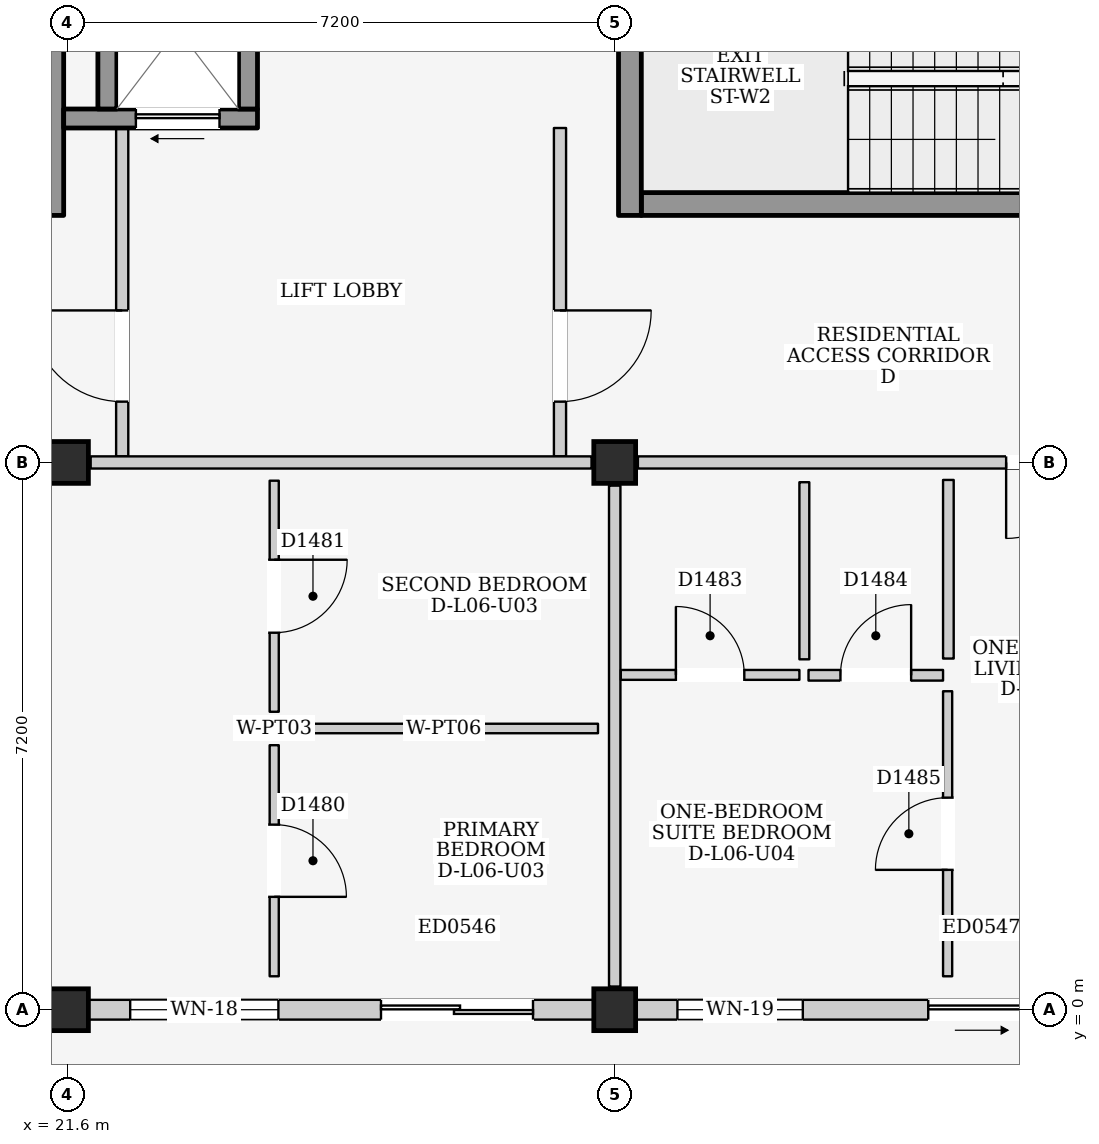
"""IFC4 building model, lengths in metres.
Left out: names, types, materials, properties, quantities, classifications, styles, units other than length and angle.
Written with IfcOpenShell. Run it as: python <this file> out.ifc"""

import sys

from ifc_helpers import new_model, si_unit, direction, frame, frame_2d, origin, origin_2d, place, context, subcontext, project, spatial, rectangle, extrude, element, fill, save


model = new_model("IFC4")
c1 = context("Model", 3, precision=1e-05, world=origin(), true_north=direction((0.0, 1.0)))
c2 = subcontext(c1, "Body", "Model", "MODEL_VIEW")
j1 = project(units=[si_unit("LENGTHUNIT", "METRE"), si_unit("PLANEANGLEUNIT", "RADIAN")], contexts=[c1])
p1 = place(None, origin())
s1 = spatial("IfcSite", under=j1, at=p1, CompositionType="ELEMENT")
p2 = place(p1, origin())
s2 = spatial("IfcBuilding", under=s1, at=p2, CompositionType="ELEMENT")
p3 = place(p2, frame((0.0, 0.0, 21.9)))
s3 = spatial("IfcBuildingStorey", under=s2, at=p3, CompositionType="ELEMENT", Elevation=21.9)
for number, where, z_axis, x_axis in (
    (1, (21.6, 0.0, 0.0), (0.0, 0.0, 1.0), (1.0, 0.0, 0.0)),
    (2, (21.6, 7.2, 0.0), (0.0, 0.0, 1.0), (1.0, 0.0, 0.0)),
    (3, (28.8, 0.0, 0.0), (0.0, 0.0, 1.0), (1.0, 0.0, 0.0)),
    (4, (28.8, 7.2, 0.0), (0.0, 0.0, 1.0), (1.0, 0.0, 0.0)),
):
    element("IfcColumn", number, at=place(p3, frame(where, z_axis=z_axis, x_axis=x_axis)), inside=s3, PredefinedType="COLUMN", context=c2, shape_type="SweptSolid", body=[
        extrude(rectangle(XDim=0.55, YDim=0.55, at=origin_2d()), origin(), (0.0, 0.0, 1.0), 3.2),
    ])
p4 = place(p3, frame((21.875, 0.0, 0.0), z_axis=(0.0, 0.0, 1.0), x_axis=(1.0, 0.0, 0.0)))
e5 = element("IfcWall", 5, at=p4, inside=s3, PredefinedType="ELEMENTEDWALL", context=c2, shape_type="SweptSolid", body=[
    extrude(rectangle(XDim=6.65, YDim=0.26, at=frame_2d((3.325, 0.0))), origin(), (0.0, 0.0, 1.0), 2.515),
])
p5 = place(p4, frame((3.85, 0.0, 0.0)))
e6 = element("IfcOpeningElement", 6, at=p5, cuts=e5, PredefinedType="OPENING", context=c2, shape_type="SweptSolid", body=[
    extrude(rectangle(XDim=2.0, YDim=2.12, at=frame_2d((1.0, 1.06))), frame((0.0, 0.145, 0.0), z_axis=(0.0, -1.0, 0.0), x_axis=(1.0, 0.0, 0.0)), (0.0, 0.0, 1.0), 0.29),
])
p6 = place(p4, frame((0.55, 0.0, 0.855)))
e7 = element("IfcOpeningElement", 7, at=p6, cuts=e5, PredefinedType="OPENING", context=c2, shape_type="SweptSolid", body=[
    extrude(rectangle(XDim=1.95, YDim=1.55, at=frame_2d((0.975, 0.775))), frame((0.0, 0.145, 0.0), z_axis=(0.0, -1.0, 0.0), x_axis=(1.0, 0.0, 0.0)), (0.0, 0.0, 1.0), 0.29),
])
p7 = place(p3, frame((29.075, 0.0, 0.0), z_axis=(0.0, 0.0, 1.0), x_axis=(1.0, 0.0, 0.0)))
e8 = element("IfcWall", 8, at=p7, inside=s3, PredefinedType="ELEMENTEDWALL", context=c2, shape_type="SweptSolid", body=[
    extrude(rectangle(XDim=6.65, YDim=0.26, at=frame_2d((3.325, 0.0))), origin(), (0.0, 0.0, 1.0), 2.515),
])
p8 = place(p7, frame((3.85, 0.0, 0.0)))
e9 = element("IfcOpeningElement", 9, at=p8, cuts=e8, PredefinedType="OPENING", context=c2, shape_type="SweptSolid", body=[
    extrude(rectangle(XDim=1.4, YDim=2.1, at=frame_2d((0.7, 1.05))), frame((0.0, 0.145, 0.0), z_axis=(0.0, -1.0, 0.0), x_axis=(1.0, 0.0, 0.0)), (0.0, 0.0, 1.0), 0.29),
])
p9 = place(p7, frame((0.55, 0.0, 0.9)))
e10 = element("IfcOpeningElement", 10, at=p9, cuts=e8, PredefinedType="OPENING", context=c2, shape_type="SweptSolid", body=[
    extrude(rectangle(XDim=1.65, YDim=1.35, at=frame_2d((0.825, 0.675))), frame((0.0, 0.145, 0.0), z_axis=(0.0, -1.0, 0.0), x_axis=(1.0, 0.0, 0.0)), (0.0, 0.0, 1.0), 0.29),
])
p10 = place(p3, frame((21.4, 10.45, 0.0), z_axis=(0.0, 0.0, 1.0), x_axis=(0.0, 1.0, 0.0)))
e11 = element("IfcWall", 11, at=p10, inside=s3, PredefinedType="SHEAR", context=c2, shape_type="SweptSolid", body=[
    extrude(rectangle(XDim=3.75, YDim=0.3, at=frame_2d((1.875, 0.0))), origin(), (0.0, 0.0, 1.0), 2.98),
])
p11 = place(p3, frame((22.32, 7.28, 0.0), z_axis=(0.0, 0.0, 1.0), x_axis=(0.0, 1.0, 0.0)))
e12 = element("IfcWall", 12, at=p11, inside=s3, PredefinedType="PARTITIONING", context=c2, shape_type="SweptSolid", body=[
    extrude(rectangle(XDim=4.32, YDim=0.16, at=frame_2d((2.16, 0.0))), origin(), (0.0, 0.0, 1.0), 2.98),
])
p12 = place(p11, frame((0.72, 0.0, 0.0)))
e13 = element("IfcOpeningElement", 13, at=p12, cuts=e12, PredefinedType="OPENING", context=c2, shape_type="SweptSolid", body=[
    extrude(rectangle(XDim=1.2, YDim=2.2, at=frame_2d((0.6, 1.1))), frame((0.0, 0.095, 0.0), z_axis=(0.0, -1.0, 0.0), x_axis=(1.0, 0.0, 0.0)), (0.0, 0.0, 1.0), 0.19),
])
p13 = place(p3, frame((28.08, 7.28, 0.0), z_axis=(0.0, 0.0, 1.0), x_axis=(0.0, 1.0, 0.0)))
e14 = element("IfcWall", 14, at=p13, inside=s3, PredefinedType="PARTITIONING", context=c2, shape_type="SweptSolid", body=[
    extrude(rectangle(XDim=4.32, YDim=0.16, at=frame_2d((2.16, 0.0))), origin(), (0.0, 0.0, 1.0), 2.98),
])
p14 = place(p13, frame((0.72, 0.0, 0.0)))
e15 = element("IfcOpeningElement", 15, at=p14, cuts=e14, PredefinedType="OPENING", context=c2, shape_type="SweptSolid", body=[
    extrude(rectangle(XDim=1.2, YDim=2.2, at=frame_2d((0.6, 1.1))), frame((0.0, 0.095, 0.0), z_axis=(0.0, -1.0, 0.0), x_axis=(1.0, 0.0, 0.0)), (0.0, 0.0, 1.0), 0.19),
])
p15 = place(p3, frame((21.55, 11.725, 0.0), z_axis=(0.0, 0.0, 1.0), x_axis=(1.0, 0.0, 0.0)))
e16 = element("IfcWall", 16, at=p15, inside=s3, PredefinedType="SHEAR", context=c2, shape_type="SweptSolid", body=[
    extrude(rectangle(XDim=2.55, YDim=0.25, at=frame_2d((1.275, 0.0))), origin(), (0.0, 0.0, 1.0), 2.98),
])
p16 = place(p15, frame((0.95, 0.0, 0.0)))
e17 = element("IfcOpeningElement", 17, at=p16, cuts=e16, PredefinedType="OPENING", context=c2, shape_type="SweptSolid", body=[
    extrude(rectangle(XDim=1.1, YDim=2.15, at=frame_2d((0.55, 1.075))), frame((0.0, 0.14, 0.0), z_axis=(0.0, -1.0, 0.0), x_axis=(1.0, 0.0, 0.0)), (0.0, 0.0, 1.0), 0.28),
])
for number, where, z_axis, x_axis in (
    (18, (22.125, 11.85, 0.0), (0.0, 0.0, 1.0), (0.0, 1.0, 0.0)),
    (19, (23.975, 11.85, 0.0), (0.0, 0.0, 1.0), (0.0, 1.0, 0.0)),
):
    element("IfcWall", number, at=place(p3, frame(where, z_axis=z_axis, x_axis=x_axis)), inside=s3, PredefinedType="SHEAR", context=c2, shape_type="SweptSolid", body=[
        extrude(rectangle(XDim=2.1, YDim=0.25, at=frame_2d((1.05, 0.0))), origin(), (0.0, 0.0, 1.0), 2.98),
    ])
p17 = place(p3, frame((29.15, 10.6, 0.0), z_axis=(0.0, 0.0, 1.0), x_axis=(1.0, 0.0, 0.0)))
e20 = element("IfcWall", 20, at=p17, inside=s3, PredefinedType="SHEAR", context=c2, shape_type="SweptSolid", body=[
    extrude(rectangle(XDim=6.5, YDim=0.3, at=frame_2d((3.25, 0.0))), origin(), (0.0, 0.0, 1.0), 2.98),
])
p18 = place(p17, frame((5.17, 0.0, 0.0)))
e21 = element("IfcOpeningElement", 21, at=p18, cuts=e20, PredefinedType="OPENING", context=c2, shape_type="SweptSolid", body=[
    extrude(rectangle(XDim=1.15, YDim=2.2, at=frame_2d((0.575, 1.1))), frame((0.0, 0.165, 0.0), z_axis=(0.0, -1.0, 0.0), x_axis=(1.0, 0.0, 0.0)), (0.0, 0.0, 1.0), 0.33),
])
p19 = place(p3, frame((29.0, 10.45, 0.0), z_axis=(0.0, 0.0, 1.0), x_axis=(0.0, 1.0, 0.0)))
e22 = element("IfcWall", 22, at=p19, inside=s3, PredefinedType="SHEAR", context=c2, shape_type="SweptSolid", body=[
    extrude(rectangle(XDim=3.6, YDim=0.3, at=frame_2d((1.8, 0.0))), origin(), (0.0, 0.0, 1.0), 2.98),
])
p20 = place(p3, frame((21.905, 7.2, 0.0), z_axis=(0.0, 0.0, 1.0), x_axis=(1.0, 0.0, 0.0)))
e23 = element("IfcWall", 23, at=p20, inside=s3, PredefinedType="PARTITIONING", context=c2, shape_type="SweptSolid", body=[
    extrude(rectangle(XDim=6.59, YDim=0.16, at=frame_2d((3.295, 0.0))), origin(), (0.0, 0.0, 1.0), 2.365),
])
p21 = place(p3, frame((28.8, 0.305, 0.0), z_axis=(0.0, 0.0, 1.0), x_axis=(0.0, 1.0, 0.0)))
e24 = element("IfcWall", 24, at=p21, inside=s3, PredefinedType="PARTITIONING", context=c2, shape_type="SweptSolid", body=[
    extrude(rectangle(XDim=6.59, YDim=0.15, at=frame_2d((3.295, 0.0))), origin(), (0.0, 0.0, 1.0), 2.465),
])
p22 = place(p3, frame((24.32, 0.44, 0.0), z_axis=(0.0, 0.0, 1.0), x_axis=(0.0, 1.0, 0.0)))
e25 = element("IfcWall", 25, at=p22, inside=s3, PredefinedType="PARTITIONING", context=c2, shape_type="SweptSolid", body=[
    extrude(rectangle(XDim=3.04, YDim=0.12, at=frame_2d((1.52, 0.0))), origin(), (0.0, 0.0, 1.0), 2.98),
])
p23 = place(p22, frame((1.045, 0.0, 0.0)))
e26 = element("IfcOpeningElement", 26, at=p23, cuts=e25, PredefinedType="OPENING", context=c2, shape_type="SweptSolid", body=[
    extrude(rectangle(XDim=0.95, YDim=2.15, at=frame_2d((0.475, 1.075))), frame((0.0, 0.075, 0.0), z_axis=(0.0, -1.0, 0.0), x_axis=(1.0, 0.0, 0.0)), (0.0, 0.0, 1.0), 0.15),
])
p24 = place(p3, frame((24.52, 3.7, 0.0), z_axis=(0.0, 0.0, 1.0), x_axis=(1.0, 0.0, 0.0)))
e27 = element("IfcWall", 27, at=p24, inside=s3, PredefinedType="PARTITIONING", context=c2, shape_type="SweptSolid", body=[
    extrude(rectangle(XDim=4.06, YDim=0.125, at=frame_2d((2.03, 0.0))), origin(), (0.0, 0.0, 1.0), 2.98),
])
p25 = place(p3, frame((24.32, 3.92, 0.0), z_axis=(0.0, 0.0, 1.0), x_axis=(0.0, 1.0, 0.0)))
e28 = element("IfcWall", 28, at=p25, inside=s3, PredefinedType="PARTITIONING", context=c2, shape_type="SweptSolid", body=[
    extrude(rectangle(XDim=3.04, YDim=0.12, at=frame_2d((1.52, 0.0))), origin(), (0.0, 0.0, 1.0), 2.98),
])
p26 = place(p25, frame((1.04, 0.0, 0.0)))
e29 = element("IfcOpeningElement", 29, at=p26, cuts=e28, PredefinedType="OPENING", context=c2, shape_type="SweptSolid", body=[
    extrude(rectangle(XDim=0.96, YDim=2.15, at=frame_2d((0.48, 1.075))), frame((0.0, 0.075, 0.0), z_axis=(0.0, -1.0, 0.0), x_axis=(1.0, 0.0, 0.0)), (0.0, 0.0, 1.0), 0.15),
])
p27 = place(p3, frame((29.105, 7.2, 0.0), z_axis=(0.0, 0.0, 1.0), x_axis=(1.0, 0.0, 0.0)))
e30 = element("IfcWall", 30, at=p27, inside=s3, PredefinedType="PARTITIONING", context=c2, shape_type="SweptSolid", body=[
    extrude(rectangle(XDim=6.59, YDim=0.16, at=frame_2d((3.295, 0.0))), origin(), (0.0, 0.0, 1.0), 2.365),
])
p28 = place(p27, frame((4.845, 0.0, 0.0)))
e31 = element("IfcOpeningElement", 31, at=p28, cuts=e30, PredefinedType="OPENING", context=c2, shape_type="SweptSolid", body=[
    extrude(rectangle(XDim=1.0, YDim=2.15, at=frame_2d((0.5, 1.075))), frame((0.0, 0.095, 0.0), z_axis=(0.0, -1.0, 0.0), x_axis=(1.0, 0.0, 0.0)), (0.0, 0.0, 1.0), 0.19),
])
p29 = place(p3, frame((28.88, 4.405, 0.0), z_axis=(0.0, 0.0, 1.0), x_axis=(1.0, 0.0, 0.0)))
e32 = element("IfcWall", 32, at=p29, inside=s3, PredefinedType="PARTITIONING", context=c2, shape_type="SweptSolid", body=[
    extrude(rectangle(XDim=2.35, YDim=0.13, at=frame_2d((1.175, 0.0))), origin(), (0.0, 0.0, 1.0), 2.98),
])
p30 = place(p29, frame((0.725, 0.0, 0.0)))
e33 = element("IfcOpeningElement", 33, at=p30, cuts=e32, PredefinedType="OPENING", context=c2, shape_type="SweptSolid", body=[
    extrude(rectangle(XDim=0.9, YDim=2.1, at=frame_2d((0.45, 1.05))), frame((0.0, 0.08, 0.0), z_axis=(0.0, -1.0, 0.0), x_axis=(1.0, 0.0, 0.0)), (0.0, 0.0, 1.0), 0.16),
])
p31 = place(p3, frame((31.295, 4.61, 0.0), z_axis=(0.0, 0.0, 1.0), x_axis=(0.0, 1.0, 0.0)))
e34 = element("IfcWall", 34, at=p31, inside=s3, PredefinedType="PARTITIONING", context=c2, shape_type="SweptSolid", body=[
    extrude(rectangle(XDim=2.33, YDim=0.13, at=frame_2d((1.165, 0.0))), origin(), (0.0, 0.0, 1.0), 2.98),
])
p32 = place(p3, frame((31.35, 4.4, 0.0), z_axis=(0.0, 0.0, 1.0), x_axis=(1.0, 0.0, 0.0)))
e35 = element("IfcWall", 35, at=p32, inside=s3, PredefinedType="PARTITIONING", context=c2, shape_type="SweptSolid", body=[
    extrude(rectangle(XDim=1.77, YDim=0.14, at=frame_2d((0.885, 0.0))), origin(), (0.0, 0.0, 1.0), 2.98),
])
p33 = place(p32, frame((0.42, 0.0, 0.0)))
e36 = element("IfcOpeningElement", 36, at=p33, cuts=e35, PredefinedType="OPENING", context=c2, shape_type="SweptSolid", body=[
    extrude(rectangle(XDim=0.93, YDim=2.14, at=frame_2d((0.465, 1.07))), frame((0.0, 0.085, 0.0), z_axis=(0.0, -1.0, 0.0), x_axis=(1.0, 0.0, 0.0)), (0.0, 0.0, 1.0), 0.17),
])
p34 = place(p3, frame((33.19, 4.62, 0.0), z_axis=(0.0, 0.0, 1.0), x_axis=(0.0, 1.0, 0.0)))
e37 = element("IfcWall", 37, at=p34, inside=s3, PredefinedType="PARTITIONING", context=c2, shape_type="SweptSolid", body=[
    extrude(rectangle(XDim=2.35, YDim=0.14, at=frame_2d((1.175, 0.0))), origin(), (0.0, 0.0, 1.0), 2.98),
])
p35 = place(p3, frame((33.18, 0.44, 0.0), z_axis=(0.0, 0.0, 1.0), x_axis=(0.0, 1.0, 0.0)))
e38 = element("IfcWall", 38, at=p35, inside=s3, PredefinedType="PARTITIONING", context=c2, shape_type="SweptSolid", body=[
    extrude(rectangle(XDim=3.75, YDim=0.12, at=frame_2d((1.875, 0.0))), origin(), (0.0, 0.0, 1.0), 2.98),
])
p36 = place(p35, frame((1.4, 0.0, 0.0)))
e39 = element("IfcOpeningElement", 39, at=p36, cuts=e38, PredefinedType="OPENING", context=c2, shape_type="SweptSolid", body=[
    extrude(rectangle(XDim=0.95, YDim=2.15, at=frame_2d((0.475, 1.075))), frame((0.0, 0.075, 0.0), z_axis=(0.0, -1.0, 0.0), x_axis=(1.0, 0.0, 0.0)), (0.0, 0.0, 1.0), 0.15),
])
p37 = place(p5, frame((2.0, 0.0, 0.0), z_axis=(0.0, 0.0, 1.0), x_axis=(-1.0, 0.0, 0.0)))
e40 = element("IfcDoor", 40, at=p37, inside=s3, OperationType="DOUBLE_DOOR_SLIDING", PredefinedType="DOOR", context=c2, shape_type="SweptSolid", body=[
    extrude(rectangle(XDim=2.0, YDim=2.12, at=frame_2d((1.0, 1.06))), frame((0.0, 0.025, 0.0), z_axis=(0.0, -1.0, 0.0), x_axis=(1.0, 0.0, 0.0)), (0.0, 0.0, 1.0), 0.05),
])
fill(e6, e40)
p38 = place(p6, origin())
e41 = element("IfcWindow", 41, at=p38, inside=s3, PartitioningType="DOUBLE_PANEL_VERTICAL", PredefinedType="WINDOW", context=c2, shape_type="SweptSolid", body=[
    extrude(rectangle(XDim=1.95, YDim=1.55, at=frame_2d((0.975, 0.775))), frame((0.0, 0.03, 0.0), z_axis=(0.0, -1.0, 0.0), x_axis=(1.0, 0.0, 0.0)), (0.0, 0.0, 1.0), 0.06),
])
fill(e7, e41)
p39 = place(p8, frame((1.4, 0.0, 0.0), z_axis=(0.0, 0.0, 1.0), x_axis=(-1.0, 0.0, 0.0)))
e42 = element("IfcDoor", 42, at=p39, inside=s3, OperationType="SLIDING_TO_RIGHT", PredefinedType="DOOR", context=c2, shape_type="SweptSolid", body=[
    extrude(rectangle(XDim=1.4, YDim=2.1, at=frame_2d((0.7, 1.05))), frame((0.0, 0.025, 0.0), z_axis=(0.0, -1.0, 0.0), x_axis=(1.0, 0.0, 0.0)), (0.0, 0.0, 1.0), 0.05),
])
fill(e9, e42)
p40 = place(p9, origin())
e43 = element("IfcWindow", 43, at=p40, inside=s3, PartitioningType="DOUBLE_PANEL_VERTICAL", PredefinedType="WINDOW", context=c2, shape_type="SweptSolid", body=[
    extrude(rectangle(XDim=1.65, YDim=1.35, at=frame_2d((0.825, 0.675))), frame((0.0, 0.03, 0.0), z_axis=(0.0, -1.0, 0.0), x_axis=(1.0, 0.0, 0.0)), (0.0, 0.0, 1.0), 0.06),
])
fill(e10, e43)
p41 = place(p12, origin())
e44 = element("IfcDoor", 44, at=p41, inside=s3, OperationType="SINGLE_SWING_RIGHT", PredefinedType="DOOR", context=c2, shape_type="SweptSolid", body=[
    extrude(rectangle(XDim=1.2, YDim=2.2, at=frame_2d((0.6, 1.1))), frame((0.0, 0.025, 0.0), z_axis=(0.0, -1.0, 0.0), x_axis=(1.0, 0.0, 0.0)), (0.0, 0.0, 1.0), 0.05),
])
fill(e13, e44)
p42 = place(p14, frame((1.2, 0.0, 0.0), z_axis=(0.0, 0.0, 1.0), x_axis=(-1.0, 0.0, 0.0)))
e45 = element("IfcDoor", 45, at=p42, inside=s3, OperationType="SINGLE_SWING_LEFT", PredefinedType="DOOR", context=c2, shape_type="SweptSolid", body=[
    extrude(rectangle(XDim=1.2, YDim=2.2, at=frame_2d((0.6, 1.1))), frame((0.0, 0.025, 0.0), z_axis=(0.0, -1.0, 0.0), x_axis=(1.0, 0.0, 0.0)), (0.0, 0.0, 1.0), 0.05),
])
fill(e15, e45)
p43 = place(p16, frame((1.1, 0.0, 0.0), z_axis=(0.0, 0.0, 1.0), x_axis=(-1.0, 0.0, 0.0)))
e46 = element("IfcDoor", 46, at=p43, inside=s3, OperationType="SLIDING_TO_LEFT", PredefinedType="DOOR", context=c2, shape_type="SweptSolid", body=[
    extrude(rectangle(XDim=1.1, YDim=2.15, at=frame_2d((0.55, 1.075))), frame((0.0, 0.025, 0.0), z_axis=(0.0, -1.0, 0.0), x_axis=(1.0, 0.0, 0.0)), (0.0, 0.0, 1.0), 0.05),
])
fill(e17, e46)
p44 = place(p23, frame((0.95, 0.0, 0.0), z_axis=(0.0, 0.0, 1.0), x_axis=(-1.0, 0.0, 0.0)))
e47 = element("IfcDoor", 47, at=p44, inside=s3, OperationType="SINGLE_SWING_RIGHT", PredefinedType="DOOR", context=c2, shape_type="SweptSolid", body=[
    extrude(rectangle(XDim=0.95, YDim=2.15, at=frame_2d((0.475, 1.075))), frame((0.0, 0.025, 0.0), z_axis=(0.0, -1.0, 0.0), x_axis=(1.0, 0.0, 0.0)), (0.0, 0.0, 1.0), 0.05),
])
fill(e26, e47)
p45 = place(p26, frame((0.96, 0.0, 0.0), z_axis=(0.0, 0.0, 1.0), x_axis=(-1.0, 0.0, 0.0)))
e48 = element("IfcDoor", 48, at=p45, inside=s3, OperationType="SINGLE_SWING_LEFT", PredefinedType="DOOR", context=c2, shape_type="SweptSolid", body=[
    extrude(rectangle(XDim=0.96, YDim=2.15, at=frame_2d((0.48, 1.075))), frame((0.0, 0.025, 0.0), z_axis=(0.0, -1.0, 0.0), x_axis=(1.0, 0.0, 0.0)), (0.0, 0.0, 1.0), 0.05),
])
fill(e29, e48)
p46 = place(p28, frame((1.0, 0.0, 0.0), z_axis=(0.0, 0.0, 1.0), x_axis=(-1.0, 0.0, 0.0)))
e49 = element("IfcDoor", 49, at=p46, inside=s3, OperationType="SINGLE_SWING_RIGHT", PredefinedType="DOOR", context=c2, shape_type="SweptSolid", body=[
    extrude(rectangle(XDim=1.0, YDim=2.15, at=frame_2d((0.5, 1.075))), frame((0.0, 0.025, 0.0), z_axis=(0.0, -1.0, 0.0), x_axis=(1.0, 0.0, 0.0)), (0.0, 0.0, 1.0), 0.05),
])
fill(e31, e49)
p47 = place(p30, origin())
e50 = element("IfcDoor", 50, at=p47, inside=s3, OperationType="SINGLE_SWING_LEFT", PredefinedType="DOOR", context=c2, shape_type="SweptSolid", body=[
    extrude(rectangle(XDim=0.9, YDim=2.1, at=frame_2d((0.45, 1.05))), frame((0.0, 0.025, 0.0), z_axis=(0.0, -1.0, 0.0), x_axis=(1.0, 0.0, 0.0)), (0.0, 0.0, 1.0), 0.05),
])
fill(e33, e50)
p48 = place(p33, origin())
e51 = element("IfcDoor", 51, at=p48, inside=s3, OperationType="SINGLE_SWING_RIGHT", PredefinedType="DOOR", context=c2, shape_type="SweptSolid", body=[
    extrude(rectangle(XDim=0.93, YDim=2.14, at=frame_2d((0.465, 1.07))), frame((0.0, 0.025, 0.0), z_axis=(0.0, -1.0, 0.0), x_axis=(1.0, 0.0, 0.0)), (0.0, 0.0, 1.0), 0.05),
])
fill(e36, e51)
p49 = place(p36, origin())
e52 = element("IfcDoor", 52, at=p49, inside=s3, OperationType="SINGLE_SWING_LEFT", PredefinedType="DOOR", context=c2, shape_type="SweptSolid", body=[
    extrude(rectangle(XDim=0.95, YDim=2.15, at=frame_2d((0.475, 1.075))), frame((0.0, 0.025, 0.0), z_axis=(0.0, -1.0, 0.0), x_axis=(1.0, 0.0, 0.0)), (0.0, 0.0, 1.0), 0.05),
])
fill(e39, e52)
save(model, sys.argv[1])
